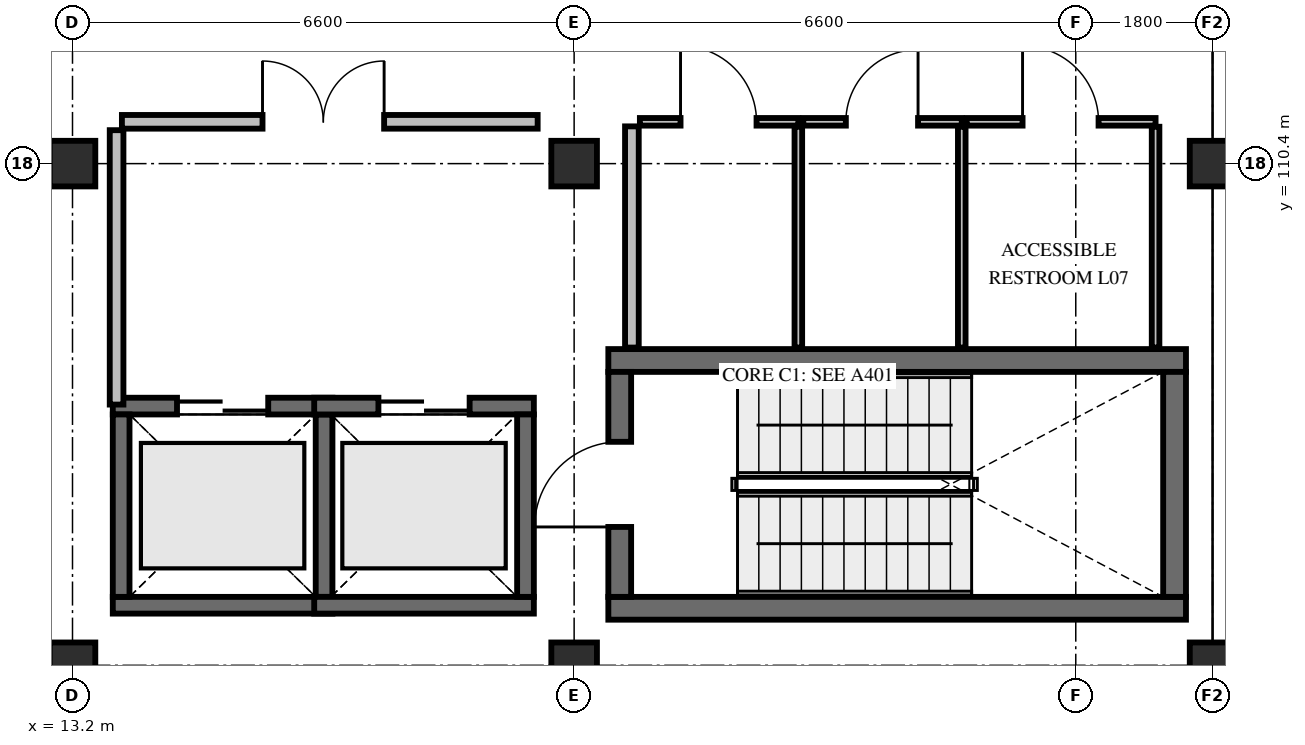
"""IFC4 building model, lengths in metres.
Left out: names, types, materials, properties, quantities, classifications, styles, units other than length and angle.
Written with IfcOpenShell. Run it as: python <this file> out.ifc"""

import sys

from ifc_helpers import new_model, si_unit, direction, frame, frame_2d, origin, origin_2d, place, context, subcontext, project, spatial, rectangle, extrude, element, fill, save


model = new_model("IFC4")
c1 = context("Model", 3, precision=1e-05, world=origin(), true_north=direction((0.0, 1.0)))
c2 = subcontext(c1, "Body", "Model", "MODEL_VIEW")
j1 = project(units=[si_unit("LENGTHUNIT", "METRE"), si_unit("PLANEANGLEUNIT", "RADIAN")], contexts=[c1])
p1 = place(None, origin())
s1 = spatial("IfcSite", under=j1, at=p1, CompositionType="ELEMENT")
p2 = place(p1, origin())
s2 = spatial("IfcBuilding", under=s1, at=p2, CompositionType="ELEMENT")
p3 = place(p2, frame((0.0, 0.0, 34.2)))
s3 = spatial("IfcBuildingStorey", under=s2, at=p3, CompositionType="ELEMENT", Elevation=34.2)
for number, where, z_axis, x_axis in (
    (1, (13.2, 103.8, 0.0), (0.0, 0.0, 1.0), (1.0, 0.0, 0.0)),
    (2, (13.2, 110.4, 0.0), (0.0, 0.0, 1.0), (1.0, 0.0, 0.0)),
    (3, (19.8, 103.8, 0.0), (0.0, 0.0, 1.0), (1.0, 0.0, 0.0)),
    (4, (19.8, 110.4, 0.0), (0.0, 0.0, 1.0), (1.0, 0.0, 0.0)),
    (5, (28.2, 103.8, 0.0), (0.0, 0.0, 1.0), (1.0, 0.0, 0.0)),
    (6, (28.2, 110.4, 0.0), (0.0, 0.0, 1.0), (1.0, 0.0, 0.0)),
):
    element("IfcColumn", number, at=place(p3, frame(where, z_axis=z_axis, x_axis=x_axis)), inside=s3, PredefinedType="COLUMN", context=c2, shape_type="SweptSolid", body=[
        extrude(rectangle(XDim=0.6, YDim=0.6, at=origin_2d()), origin(), (0.0, 0.0, 1.0), 4.2),
    ])
for number, where, z_axis, x_axis in (
    (7, (20.25, 104.55, 0.0), (0.0, 0.0, 1.0), (1.0, 0.0, 0.0)),
    (8, (20.25, 107.81, 0.0), (0.0, 0.0, 1.0), (1.0, 0.0, 0.0)),
):
    element("IfcWall", number, at=place(p3, frame(where, z_axis=z_axis, x_axis=x_axis)), inside=s3, PredefinedType="SHEAR", context=c2, shape_type="SweptSolid", body=[
        extrude(rectangle(XDim=7.6, YDim=0.3, at=frame_2d((3.8, 0.0))), origin(), (0.0, 0.0, 1.0), 3.92),
    ])
p4 = place(p3, frame((20.4, 104.7, 0.0), z_axis=(0.0, 0.0, 1.0), x_axis=(0.0, 1.0, 0.0)))
e9 = element("IfcWall", 9, at=p4, inside=s3, PredefinedType="SHEAR", context=c2, shape_type="SweptSolid", body=[
    extrude(rectangle(XDim=2.96, YDim=0.3, at=frame_2d((1.48, 0.0))), origin(), (0.0, 0.0, 1.0), 3.92),
])
p5 = place(p4, frame((0.92, 0.0, 0.0)))
e10 = element("IfcOpeningElement", 10, at=p5, cuts=e9, PredefinedType="OPENING", context=c2, shape_type="SweptSolid", body=[
    extrude(rectangle(XDim=1.12, YDim=2.2, at=frame_2d((0.56, 1.1))), frame((0.0, 0.165, 0.0), z_axis=(0.0, -1.0, 0.0), x_axis=(1.0, 0.0, 0.0)), (0.0, 0.0, 1.0), 0.33),
])
p6 = place(p3, frame((27.7, 104.7, 0.0), z_axis=(0.0, 0.0, 1.0), x_axis=(0.0, 1.0, 0.0)))
e11 = element("IfcWall", 11, at=p6, inside=s3, PredefinedType="SHEAR", context=c2, shape_type="SweptSolid", body=[
    extrude(rectangle(XDim=2.96, YDim=0.3, at=frame_2d((1.48, 0.0))), origin(), (0.0, 0.0, 1.0), 3.92),
])
p7 = place(p3, frame((13.73, 104.59, 0.0), z_axis=(0.0, 0.0, 1.0), x_axis=(1.0, 0.0, 0.0)))
e12 = element("IfcWall", 12, at=p7, inside=s3, PredefinedType="SHEAR", context=c2, shape_type="SweptSolid", body=[
    extrude(rectangle(XDim=2.89, YDim=0.22, at=frame_2d((1.445, 0.0))), origin(), (0.0, 0.0, 1.0), 3.92),
])
p8 = place(p3, frame((13.73, 107.21, 0.0), z_axis=(0.0, 0.0, 1.0), x_axis=(1.0, 0.0, 0.0)))
e13 = element("IfcWall", 13, at=p8, inside=s3, PredefinedType="SHEAR", context=c2, shape_type="SweptSolid", body=[
    extrude(rectangle(XDim=2.89, YDim=0.22, at=frame_2d((1.445, 0.0))), origin(), (0.0, 0.0, 1.0), 3.92),
])
p9 = place(p8, frame((0.845, 0.0, 0.0)))
e14 = element("IfcOpeningElement", 14, at=p9, cuts=e13, PredefinedType="OPENING", context=c2, shape_type="SweptSolid", body=[
    extrude(rectangle(XDim=1.2, YDim=2.2, at=frame_2d((0.6, 1.1))), frame((0.0, 0.125, 0.0), z_axis=(0.0, -1.0, 0.0), x_axis=(1.0, 0.0, 0.0)), (0.0, 0.0, 1.0), 0.25),
])
for number, where, z_axis, x_axis in (
    (15, (13.84, 104.7, 0.0), (0.0, 0.0, 1.0), (0.0, 1.0, 0.0)),
    (16, (16.51, 104.7, 0.0), (0.0, 0.0, 1.0), (0.0, 1.0, 0.0)),
):
    element("IfcWall", number, at=place(p3, frame(where, z_axis=z_axis, x_axis=x_axis)), inside=s3, PredefinedType="SHEAR", context=c2, shape_type="SweptSolid", body=[
        extrude(rectangle(XDim=2.4, YDim=0.22, at=frame_2d((1.2, 0.0))), origin(), (0.0, 0.0, 1.0), 3.92),
    ])
p10 = place(p3, frame((16.38, 104.59, 0.0), z_axis=(0.0, 0.0, 1.0), x_axis=(1.0, 0.0, 0.0)))
e17 = element("IfcWall", 17, at=p10, inside=s3, PredefinedType="SHEAR", context=c2, shape_type="SweptSolid", body=[
    extrude(rectangle(XDim=2.89, YDim=0.22, at=frame_2d((1.445, 0.0))), origin(), (0.0, 0.0, 1.0), 3.92),
])
p11 = place(p3, frame((16.38, 107.21, 0.0), z_axis=(0.0, 0.0, 1.0), x_axis=(1.0, 0.0, 0.0)))
e18 = element("IfcWall", 18, at=p11, inside=s3, PredefinedType="SHEAR", context=c2, shape_type="SweptSolid", body=[
    extrude(rectangle(XDim=2.89, YDim=0.22, at=frame_2d((1.445, 0.0))), origin(), (0.0, 0.0, 1.0), 3.92),
])
p12 = place(p11, frame((0.845, 0.0, 0.0)))
e19 = element("IfcOpeningElement", 19, at=p12, cuts=e18, PredefinedType="OPENING", context=c2, shape_type="SweptSolid", body=[
    extrude(rectangle(XDim=1.2, YDim=2.2, at=frame_2d((0.6, 1.1))), frame((0.0, 0.125, 0.0), z_axis=(0.0, -1.0, 0.0), x_axis=(1.0, 0.0, 0.0)), (0.0, 0.0, 1.0), 0.25),
])
p13 = place(p3, frame((19.16, 104.7, 0.0), z_axis=(0.0, 0.0, 1.0), x_axis=(0.0, 1.0, 0.0)))
e20 = element("IfcWall", 20, at=p13, inside=s3, PredefinedType="SHEAR", context=c2, shape_type="SweptSolid", body=[
    extrude(rectangle(XDim=2.4, YDim=0.22, at=frame_2d((1.2, 0.0))), origin(), (0.0, 0.0, 1.0), 3.92),
])
p14 = place(p3, frame((13.85, 110.95, 0.0), z_axis=(0.0, 0.0, 1.0), x_axis=(1.0, 0.0, 0.0)))
e21 = element("IfcWall", 21, at=p14, inside=s3, PredefinedType="PARTITIONING", context=c2, shape_type="SweptSolid", body=[
    extrude(rectangle(XDim=5.47, YDim=0.18, at=frame_2d((2.735, 0.0))), origin(), (0.0, 0.0, 1.0), 3.745),
])
p15 = place(p14, frame((1.85, 0.0, 0.0)))
e22 = element("IfcOpeningElement", 22, at=p15, cuts=e21, PredefinedType="OPENING", context=c2, shape_type="SweptSolid", body=[
    extrude(rectangle(XDim=1.6, YDim=2.25, at=frame_2d((0.8, 1.125))), frame((0.0, 0.105, 0.0), z_axis=(0.0, -1.0, 0.0), x_axis=(1.0, 0.0, 0.0)), (0.0, 0.0, 1.0), 0.21),
])
p16 = place(p3, frame((13.78, 107.23, 0.0), z_axis=(0.0, 0.0, 1.0), x_axis=(0.0, 1.0, 0.0)))
e23 = element("IfcWall", 23, at=p16, inside=s3, PredefinedType="PARTITIONING", context=c2, shape_type="SweptSolid", body=[
    extrude(rectangle(XDim=3.61, YDim=0.18, at=frame_2d((1.805, 0.0))), origin(), (0.0, 0.0, 1.0), 3.58),
])
p17 = place(p3, frame((20.56, 107.98, 0.0), z_axis=(0.0, 0.0, 1.0), x_axis=(0.0, 1.0, 0.0)))
e24 = element("IfcWall", 24, at=p17, inside=s3, PredefinedType="PARTITIONING", context=c2, shape_type="SweptSolid", body=[
    extrude(rectangle(XDim=2.91, YDim=0.18, at=frame_2d((1.455, 0.0))), origin(), (0.0, 0.0, 1.0), 3.23),
])
p18 = place(p3, frame((20.665, 110.95, 0.0), z_axis=(0.0, 0.0, 1.0), x_axis=(1.0, 0.0, 0.0)))
e25 = element("IfcWall", 25, at=p18, inside=s3, PredefinedType="PARTITIONING", context=c2, shape_type="SweptSolid", body=[
    extrude(rectangle(XDim=2.085, YDim=0.1, at=frame_2d((1.042, 0.0))), origin(), (0.0, 0.0, 1.0), 3.745),
])
p19 = place(p18, frame((0.535, 0.0, 0.0)))
e26 = element("IfcOpeningElement", 26, at=p19, cuts=e25, PredefinedType="OPENING", context=c2, shape_type="SweptSolid", body=[
    extrude(rectangle(XDim=1.0, YDim=2.15, at=frame_2d((0.5, 1.075))), frame((0.0, 0.065, 0.0), z_axis=(0.0, -1.0, 0.0), x_axis=(1.0, 0.0, 0.0)), (0.0, 0.0, 1.0), 0.13),
])
p20 = place(p3, frame((22.75, 107.98, 0.0), z_axis=(0.0, 0.0, 1.0), x_axis=(0.0, 1.0, 0.0)))
e27 = element("IfcWall", 27, at=p20, inside=s3, PredefinedType="PARTITIONING", context=c2, shape_type="SweptSolid", body=[
    extrude(rectangle(XDim=2.905, YDim=0.1, at=frame_2d((1.453, 0.0))), origin(), (0.0, 0.0, 1.0), 3.23),
])
p21 = place(p3, frame((22.815, 110.95, 0.0), z_axis=(0.0, 0.0, 1.0), x_axis=(1.0, 0.0, 0.0)))
e28 = element("IfcWall", 28, at=p21, inside=s3, PredefinedType="PARTITIONING", context=c2, shape_type="SweptSolid", body=[
    extrude(rectangle(XDim=2.085, YDim=0.1, at=frame_2d((1.042, 0.0))), origin(), (0.0, 0.0, 1.0), 3.9),
])
p22 = place(p21, frame((0.56, 0.0, 0.0)))
e29 = element("IfcOpeningElement", 29, at=p22, cuts=e28, PredefinedType="OPENING", context=c2, shape_type="SweptSolid", body=[
    extrude(rectangle(XDim=0.95, YDim=2.15, at=frame_2d((0.475, 1.075))), frame((0.0, 0.065, 0.0), z_axis=(0.0, -1.0, 0.0), x_axis=(1.0, 0.0, 0.0)), (0.0, 0.0, 1.0), 0.13),
])
p23 = place(p3, frame((24.9, 107.98, 0.0), z_axis=(0.0, 0.0, 1.0), x_axis=(0.0, 1.0, 0.0)))
e30 = element("IfcWall", 30, at=p23, inside=s3, PredefinedType="PARTITIONING", context=c2, shape_type="SweptSolid", body=[
    extrude(rectangle(XDim=2.905, YDim=0.1, at=frame_2d((1.453, 0.0))), origin(), (0.0, 0.0, 1.0), 3.23),
])
p24 = place(p3, frame((24.965, 110.95, 0.0), z_axis=(0.0, 0.0, 1.0), x_axis=(1.0, 0.0, 0.0)))
e31 = element("IfcWall", 31, at=p24, inside=s3, PredefinedType="PARTITIONING", context=c2, shape_type="SweptSolid", body=[
    extrude(rectangle(XDim=2.485, YDim=0.1, at=frame_2d((1.242, 0.0))), origin(), (0.0, 0.0, 1.0), 3.745),
])
p25 = place(p24, frame((0.735, 0.0, 0.0)))
e32 = element("IfcOpeningElement", 32, at=p25, cuts=e31, PredefinedType="OPENING", context=c2, shape_type="SweptSolid", body=[
    extrude(rectangle(XDim=1.0, YDim=2.15, at=frame_2d((0.5, 1.075))), frame((0.0, 0.065, 0.0), z_axis=(0.0, -1.0, 0.0), x_axis=(1.0, 0.0, 0.0)), (0.0, 0.0, 1.0), 0.13),
])
p26 = place(p3, frame((27.45, 107.98, 0.0), z_axis=(0.0, 0.0, 1.0), x_axis=(0.0, 1.0, 0.0)))
e33 = element("IfcWall", 33, at=p26, inside=s3, PredefinedType="PARTITIONING", context=c2, shape_type="SweptSolid", body=[
    extrude(rectangle(XDim=2.905, YDim=0.1, at=frame_2d((1.453, 0.0))), origin(), (0.0, 0.0, 1.0), 3.23),
])
p27 = place(p5, origin())
e34 = element("IfcDoor", 34, at=p27, inside=s3, OperationType="SINGLE_SWING_LEFT", PredefinedType="DOOR", context=c2, shape_type="SweptSolid", body=[
    extrude(rectangle(XDim=1.12, YDim=2.2, at=frame_2d((0.56, 1.1))), frame((0.0, 0.025, 0.0), z_axis=(0.0, -1.0, 0.0), x_axis=(1.0, 0.0, 0.0)), (0.0, 0.0, 1.0), 0.05),
])
fill(e10, e34)
p28 = place(p9, origin())
e35 = element("IfcDoor", 35, at=p28, inside=s3, OperationType="DOUBLE_DOOR_SLIDING", PredefinedType="DOOR", context=c2, shape_type="SweptSolid", body=[
    extrude(rectangle(XDim=1.2, YDim=2.2, at=frame_2d((0.6, 1.1))), frame((0.0, 0.025, 0.0), z_axis=(0.0, -1.0, 0.0), x_axis=(1.0, 0.0, 0.0)), (0.0, 0.0, 1.0), 0.05),
])
fill(e14, e35)
p29 = place(p12, origin())
e36 = element("IfcDoor", 36, at=p29, inside=s3, OperationType="DOUBLE_DOOR_SLIDING", PredefinedType="DOOR", context=c2, shape_type="SweptSolid", body=[
    extrude(rectangle(XDim=1.2, YDim=2.2, at=frame_2d((0.6, 1.1))), frame((0.0, 0.025, 0.0), z_axis=(0.0, -1.0, 0.0), x_axis=(1.0, 0.0, 0.0)), (0.0, 0.0, 1.0), 0.05),
])
fill(e19, e36)
p30 = place(p15, origin())
e37 = element("IfcDoor", 37, at=p30, inside=s3, OperationType="DOUBLE_DOOR_SINGLE_SWING", PredefinedType="DOOR", context=c2, shape_type="SweptSolid", body=[
    extrude(rectangle(XDim=1.6, YDim=2.25, at=frame_2d((0.8, 1.125))), frame((0.0, 0.025, 0.0), z_axis=(0.0, -1.0, 0.0), x_axis=(1.0, 0.0, 0.0)), (0.0, 0.0, 1.0), 0.05),
])
fill(e22, e37)
p31 = place(p19, origin())
e38 = element("IfcDoor", 38, at=p31, inside=s3, OperationType="SINGLE_SWING_LEFT", PredefinedType="DOOR", context=c2, shape_type="SweptSolid", body=[
    extrude(rectangle(XDim=1.0, YDim=2.15, at=frame_2d((0.5, 1.075))), frame((0.0, 0.025, 0.0), z_axis=(0.0, -1.0, 0.0), x_axis=(1.0, 0.0, 0.0)), (0.0, 0.0, 1.0), 0.05),
])
fill(e26, e38)
p32 = place(p22, origin())
e39 = element("IfcDoor", 39, at=p32, inside=s3, OperationType="SINGLE_SWING_RIGHT", PredefinedType="DOOR", context=c2, shape_type="SweptSolid", body=[
    extrude(rectangle(XDim=0.95, YDim=2.15, at=frame_2d((0.475, 1.075))), frame((0.0, 0.025, 0.0), z_axis=(0.0, -1.0, 0.0), x_axis=(1.0, 0.0, 0.0)), (0.0, 0.0, 1.0), 0.05),
])
fill(e29, e39)
p33 = place(p25, origin())
e40 = element("IfcDoor", 40, at=p33, inside=s3, OperationType="SINGLE_SWING_LEFT", PredefinedType="DOOR", context=c2, shape_type="SweptSolid", body=[
    extrude(rectangle(XDim=1.0, YDim=2.15, at=frame_2d((0.5, 1.075))), frame((0.0, 0.025, 0.0), z_axis=(0.0, -1.0, 0.0), x_axis=(1.0, 0.0, 0.0)), (0.0, 0.0, 1.0), 0.05),
])
fill(e32, e40)
save(model, sys.argv[1])
